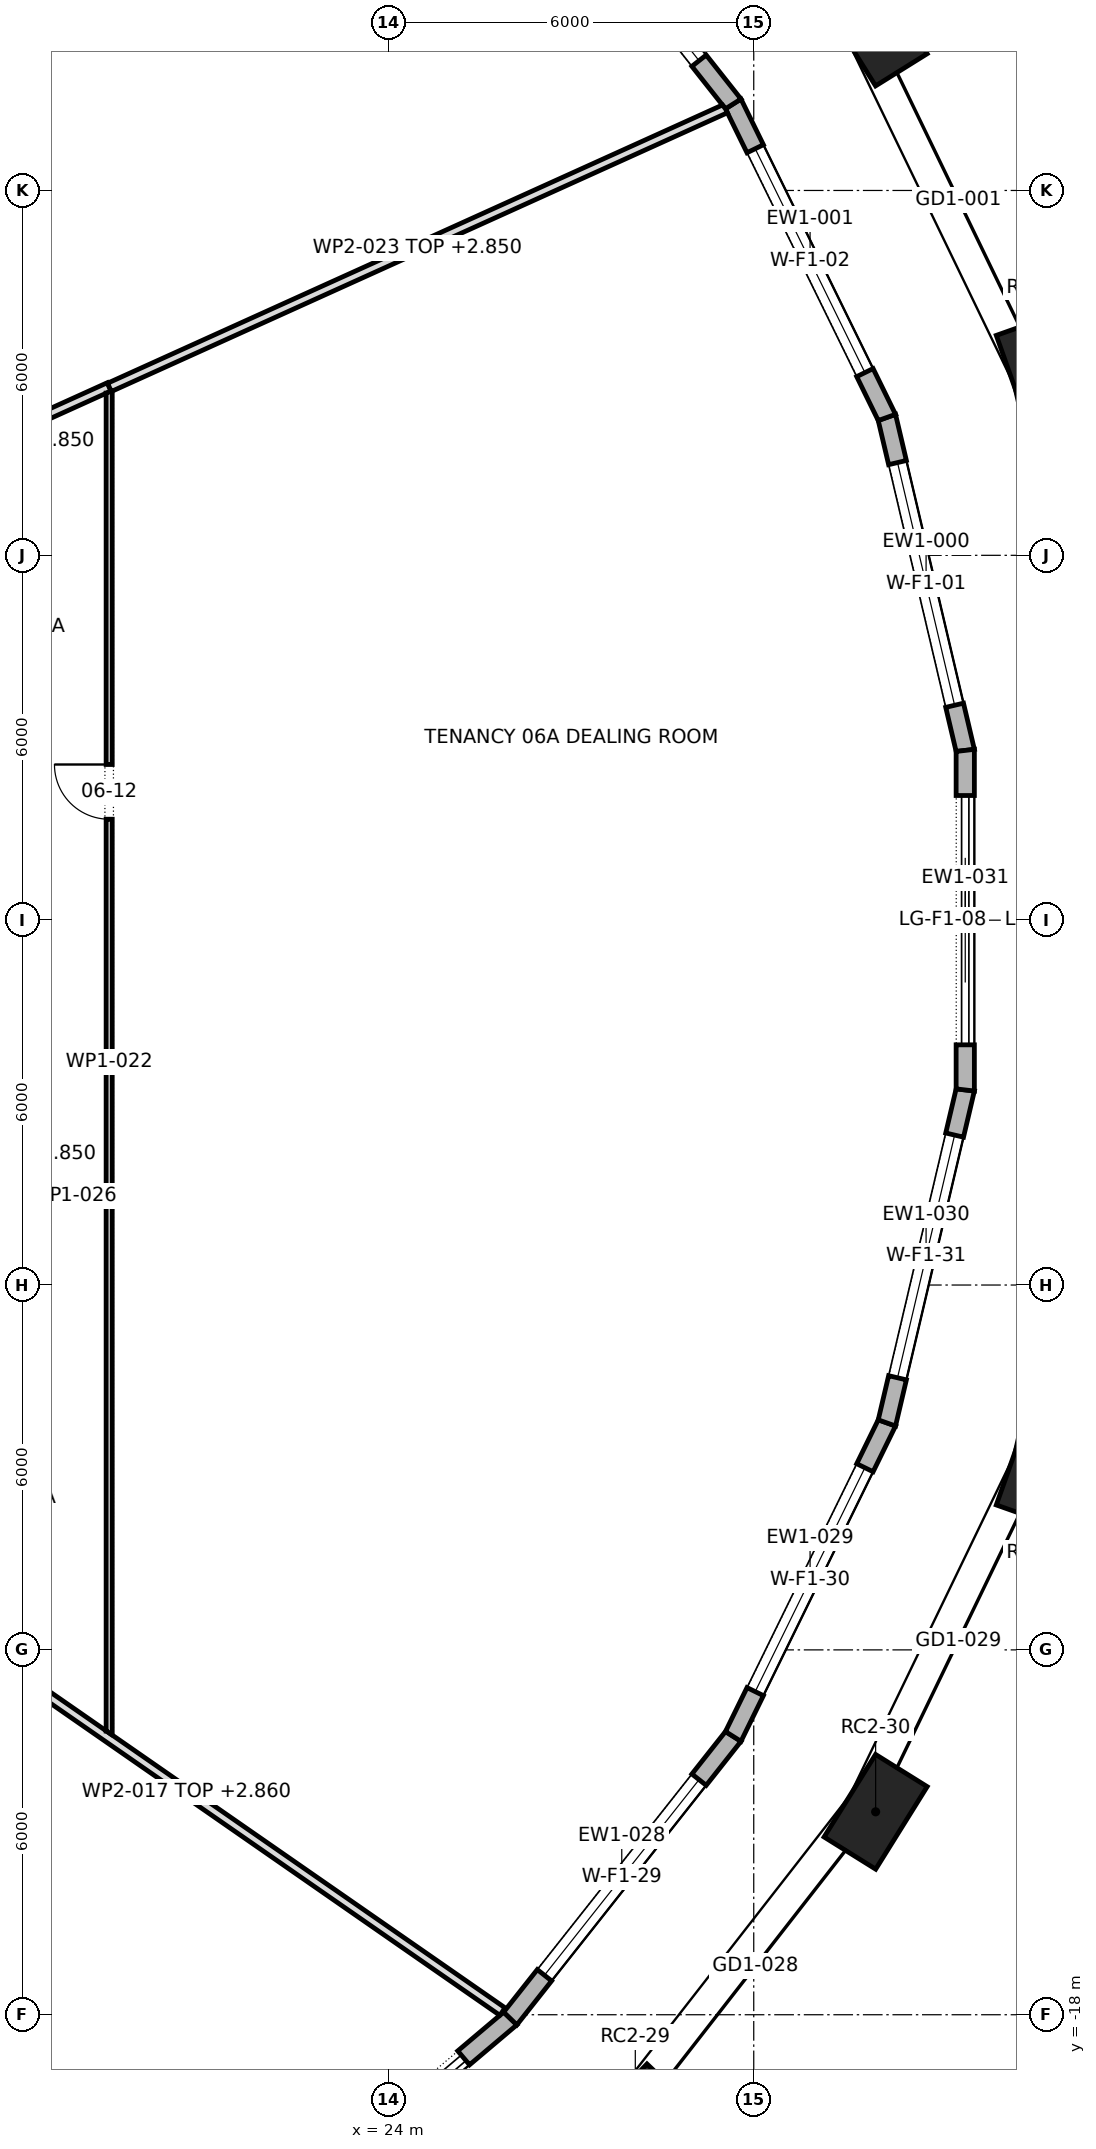
"""IFC4 building model, lengths in metres.
Left out: names, types, materials, properties, quantities, classifications, styles, units other than length and angle.
Written with IfcOpenShell. Run it as: python <this file> out.ifc"""

import sys

from ifc_helpers import new_model, si_unit, direction, frame, frame_2d, origin, origin_2d, place, context, subcontext, project, spatial, polyline, rectangle, outline, extrude, element, fill, save


model = new_model("IFC4")
c1 = context("Model", 3, precision=1e-05, world=origin(), true_north=direction((0.0, 1.0)))
c2 = subcontext(c1, "Body", "Model", "MODEL_VIEW")
j1 = project(units=[si_unit("LENGTHUNIT", "METRE"), si_unit("PLANEANGLEUNIT", "RADIAN")], contexts=[c1])
p1 = place(None, origin())
s1 = spatial("IfcSite", under=j1, at=p1, CompositionType="ELEMENT")
p2 = place(p1, origin())
s2 = spatial("IfcBuilding", under=s1, at=p2, CompositionType="ELEMENT")
p3 = place(p2, frame((0.0, 0.0, 86.5)))
s3 = spatial("IfcBuildingStorey", under=s2, at=p3, CompositionType="ELEMENT", Elevation=86.5)
for number, where, z_axis, x_axis in (
    (1, (34.727, 9.029, 0.0), (0.0, 0.0, 1.0), (-0.334, 0.943, 0.0)),
    (2, (32.004, 14.663, 0.0), (0.0, 0.0, 1.0), (-0.529, 0.849, 0.0)),
    (3, (28.052, -19.733, 0.0), (0.0, 0.0, 1.0), (0.692, 0.722, 0.0)),
    (4, (32.004, -14.663, 0.0), (0.0, 0.0, 1.0), (0.529, 0.849, 0.0)),
    (5, (34.727, -9.029, 0.0), (0.0, 0.0, 1.0), (0.334, 0.943, 0.0)),
):
    element("IfcColumn", number, at=place(p3, frame(where, z_axis=z_axis, x_axis=x_axis)), inside=s3, PredefinedType="COLUMN", context=c2, shape_type="SweptSolid", body=[
        extrude(rectangle(XDim=1.6, YDim=1.0, at=origin_2d()), origin(), (0.0, 0.0, 1.0), 4.2),
    ])
p4 = place(p3, frame((33.478, 2.792, 0.0), z_axis=(0.0, 0.0, 1.0), x_axis=(-0.229073200999, 0.973409198941, 0.0)))
e6 = element("IfcWall", 6, at=p4, inside=s3, PredefinedType="STANDARD", context=c2, shape_type="SweptSolid", body=[
    extrude(outline(polyline([(-0.017, -0.15), (5.642, -0.15), (5.608, 0.15), (0.017, 0.15), (-0.017, -0.15)])), origin(), (0.0, 0.0, 1.0), 3.9),
])
p5 = place(p4, frame((0.763, 0.0, 0.6)))
e7 = element("IfcOpeningElement", 7, at=p5, cuts=e6, PredefinedType="OPENING", context=c2, shape_type="SweptSolid", body=[
    extrude(rectangle(XDim=4.1, YDim=2.85, at=frame_2d((2.05, 1.425))), frame((0.0, 0.162, 0.0), z_axis=(0.0, -1.0, 0.0), x_axis=(1.0, 0.0, 0.0)), (0.0, 0.0, 1.0), 0.324),
])
p6 = place(p3, frame((32.19, 8.267, 0.0), z_axis=(0.0, 0.0, 1.0), x_axis=(-0.44010747541, 0.897945104162, 0.0)))
e8 = element("IfcWall", 8, at=p6, inside=s3, PredefinedType="STANDARD", context=c2, shape_type="SweptSolid", body=[
    extrude(outline(polyline([(-0.017, -0.15), (5.758, -0.15), (5.726, 0.15), (0.017, 0.15), (-0.017, -0.15)])), origin(), (0.0, 0.0, 1.0), 3.9),
])
p7 = place(p6, frame((0.821, 0.0, 0.6)))
e9 = element("IfcOpeningElement", 9, at=p7, cuts=e8, PredefinedType="OPENING", context=c2, shape_type="SweptSolid", body=[
    extrude(rectangle(XDim=4.1, YDim=2.85, at=frame_2d((2.05, 1.425))), frame((0.0, 0.162, 0.0), z_axis=(0.0, -1.0, 0.0), x_axis=(1.0, 0.0, 0.0)), (0.0, 0.0, 1.0), 0.324),
])
p8 = place(p3, frame((29.663, 13.423, 0.0), z_axis=(0.0, 0.0, 1.0), x_axis=(-0.620142219764, 0.784489405452, 0.0)))
e10 = element("IfcWall", 10, at=p8, inside=s3, PredefinedType="STANDARD", context=c2, shape_type="SweptSolid", body=[
    extrude(outline(polyline([(-0.016, -0.15), (5.927, -0.15), (5.897, 0.15), (0.016, 0.15), (-0.016, -0.15)])), origin(), (0.0, 0.0, 1.0), 3.9),
])
p9 = place(p8, frame((0.906, 0.0, 0.6)))
e11 = element("IfcOpeningElement", 11, at=p9, cuts=e10, PredefinedType="OPENING", context=c2, shape_type="SweptSolid", body=[
    extrude(rectangle(XDim=4.1, YDim=2.85, at=frame_2d((2.05, 1.425))), frame((0.0, 0.162, 0.0), z_axis=(0.0, -1.0, 0.0), x_axis=(1.0, 0.0, 0.0)), (0.0, 0.0, 1.0), 0.324),
])
p10 = place(p3, frame((21.332, -22.004, 0.0), z_axis=(0.0, 0.0, 1.0), x_axis=(0.763753100684, 0.645508482667, 0.0)))
e12 = element("IfcWall", 12, at=p10, inside=s3, PredefinedType="STANDARD", context=c2, shape_type="SweptSolid", body=[
    extrude(outline(polyline([(-0.014, -0.15), (6.123, -0.15), (6.092, 0.15), (0.014, 0.15), (-0.014, -0.15)])), origin(), (0.0, 0.0, 1.0), 3.9),
])
p11 = place(p10, frame((1.004, 0.0, 0.0)))
e13 = element("IfcOpeningElement", 13, at=p11, cuts=e12, PredefinedType="OPENING", context=c2, shape_type="SweptSolid", body=[
    extrude(rectangle(XDim=4.1, YDim=3.45, at=frame_2d((2.05, 1.725))), frame((0.0, 0.162, 0.0), z_axis=(0.0, -1.0, 0.0), x_axis=(1.0, 0.0, 0.0)), (0.0, 0.0, 1.0), 0.324),
])
p12 = place(p3, frame((25.996, -18.062, 0.0), z_axis=(0.0, 0.0, 1.0), x_axis=(0.620142219764, 0.784489405452, 0.0)))
e14 = element("IfcWall", 14, at=p12, inside=s3, PredefinedType="STANDARD", context=c2, shape_type="SweptSolid", body=[
    extrude(outline(polyline([(-0.015, -0.15), (5.928, -0.15), (5.896, 0.15), (0.015, 0.15), (-0.015, -0.15)])), origin(), (0.0, 0.0, 1.0), 3.9),
])
p13 = place(p12, frame((0.906, 0.0, 0.6)))
e15 = element("IfcOpeningElement", 15, at=p13, cuts=e14, PredefinedType="OPENING", context=c2, shape_type="SweptSolid", body=[
    extrude(rectangle(XDim=4.1, YDim=2.85, at=frame_2d((2.05, 1.425))), frame((0.0, 0.162, 0.0), z_axis=(0.0, -1.0, 0.0), x_axis=(1.0, 0.0, 0.0)), (0.0, 0.0, 1.0), 0.324),
])
p14 = place(p3, frame((29.663, -13.423, 0.0), z_axis=(0.0, 0.0, 1.0), x_axis=(0.44010747541, 0.897945104162, 0.0)))
e16 = element("IfcWall", 16, at=p14, inside=s3, PredefinedType="STANDARD", context=c2, shape_type="SweptSolid", body=[
    extrude(outline(polyline([(-0.016, -0.15), (5.759, -0.15), (5.725, 0.15), (0.016, 0.15), (-0.016, -0.15)])), origin(), (0.0, 0.0, 1.0), 3.9),
])
p15 = place(p14, frame((0.821, 0.0, 0.6)))
e17 = element("IfcOpeningElement", 17, at=p15, cuts=e16, PredefinedType="OPENING", context=c2, shape_type="SweptSolid", body=[
    extrude(rectangle(XDim=4.1, YDim=2.85, at=frame_2d((2.05, 1.425))), frame((0.0, 0.162, 0.0), z_axis=(0.0, -1.0, 0.0), x_axis=(1.0, 0.0, 0.0)), (0.0, 0.0, 1.0), 0.324),
])
p16 = place(p3, frame((32.19, -8.267, 0.0), z_axis=(0.0, 0.0, 1.0), x_axis=(0.229073200999, 0.973409198941, 0.0)))
e18 = element("IfcWall", 18, at=p16, inside=s3, PredefinedType="STANDARD", context=c2, shape_type="SweptSolid", body=[
    extrude(outline(polyline([(-0.017, -0.15), (5.643, -0.15), (5.608, 0.15), (0.017, 0.15), (-0.017, -0.15)])), origin(), (0.0, 0.0, 1.0), 3.9),
])
p17 = place(p16, frame((0.763, 0.0, 0.6)))
e19 = element("IfcOpeningElement", 19, at=p17, cuts=e18, PredefinedType="OPENING", context=c2, shape_type="SweptSolid", body=[
    extrude(rectangle(XDim=4.1, YDim=2.85, at=frame_2d((2.05, 1.425))), frame((0.0, 0.162, 0.0), z_axis=(0.0, -1.0, 0.0), x_axis=(1.0, 0.0, 0.0)), (0.0, 0.0, 1.0), 0.324),
])
p18 = place(p3, frame((33.478, -2.792, 0.0), z_axis=(0.0, 0.0, 1.0), x_axis=(0.0, 1.0, 0.0)))
e20 = element("IfcWall", 20, at=p18, inside=s3, PredefinedType="STANDARD", context=c2, shape_type="SweptSolid", body=[
    extrude(outline(polyline([(-0.017, -0.15), (5.601, -0.15), (5.566, 0.15), (0.017, 0.15), (-0.017, -0.15)])), origin(), (0.0, 0.0, 1.0), 3.9),
])
p19 = place(p18, frame((0.742, 0.0, 0.0)))
e21 = element("IfcOpeningElement", 21, at=p19, cuts=e20, PredefinedType="OPENING", context=c2, shape_type="SweptSolid", body=[
    extrude(rectangle(XDim=4.1, YDim=3.45, at=frame_2d((2.05, 1.725))), frame((0.0, 0.162, 0.0), z_axis=(0.0, -1.0, 0.0), x_axis=(1.0, 0.0, 0.0)), (0.0, 0.0, 1.0), 0.324),
])
p20 = place(p3, frame((15.418, -10.692, 0.0), z_axis=(0.0, 0.0, 1.0), x_axis=(0.821423906774, -0.57031812647, 0.0)))
e22 = element("IfcWall", 22, at=p20, inside=s3, PredefinedType="PARTITIONING", context=c2, shape_type="SweptSolid", body=[
    extrude(outline(polyline([(0.122, -0.075), (1.922, -0.075), (3.722, -0.075), (5.522, -0.075), (7.322, -0.075), (9.122, -0.075), (10.922, -0.075), (12.722, -0.075), (12.722, -0.074), (12.722, 0.075), (10.727, 0.075), (8.732, 0.075), (6.737, 0.075), (4.741, 0.075), (4.737, 0.072), (4.735, 0.075), (3.157, 0.075), (1.578, 0.075), (0.0, 0.075), (0.0, 0.074), (0.028, 0.034), (0.04, 0.043), (0.122, -0.075)])), origin(), (0.0, 0.0, 1.0), 2.86),
])
p21 = place(p3, frame((15.444, 6.98, 0.0), z_axis=(0.0, 0.0, 1.0), x_axis=(0.911064178848, 0.412264553436, 0.0)))
e23 = element("IfcWall", 23, at=p21, inside=s3, PredefinedType="PARTITIONING", context=c2, shape_type="SweptSolid", body=[
    extrude(outline(polyline([(0.0, -0.075), (1.418, -0.075), (2.835, -0.075), (4.253, -0.075), (4.254, -0.073), (4.259, -0.075), (4.342, -0.075), (4.342, 0.075), (2.917, 0.075), (1.493, 0.075), (0.068, 0.075), (0.0, -0.075)])), origin(), (0.0, 0.0, 1.0), 2.85),
])
p22 = place(p3, frame((19.4, -13.4, 0.0), z_axis=(0.0, 0.0, 1.0), x_axis=(0.0, 1.0, 0.0)))
e24 = element("IfcWall", 24, at=p22, inside=s3, PredefinedType="PARTITIONING", context=c2, shape_type="SweptSolid", body=[
    extrude(outline(polyline([(22.1, -0.05), (22.1, -0.049), (22.094, -0.036), (22.1, -0.033), (22.1, -0.027), (22.065, 0.05), (20.186, 0.05), (18.307, 0.05), (16.427, 0.05), (14.548, 0.05), (12.669, 0.05), (10.79, 0.05), (8.91, 0.05), (8.91, 0.05), (8.81, 0.05), (8.81, 0.05), (7.062, 0.05), (5.314, 0.05), (3.566, 0.05), (1.817, 0.05), (0.069, 0.05), (0.0, -0.05), (0.0, -0.05), (1.842, -0.05), (3.683, -0.05), (5.525, -0.05), (7.367, -0.05), (9.208, -0.05), (11.05, -0.05), (12.892, -0.05), (14.734, -0.05), (16.575, -0.05), (18.417, -0.05), (20.259, -0.05), (22.1, -0.05)])), origin(), (0.0, 0.0, 1.0), 3.9),
])
p23 = place(p22, frame((15.061, 0.0, 0.0)))
e25 = element("IfcOpeningElement", 25, at=p23, cuts=e24, PredefinedType="OPENING", context=c2, shape_type="SweptSolid", body=[
    extrude(rectangle(XDim=0.9, YDim=2.1, at=frame_2d((0.45, 1.05))), frame((0.0, 0.062, 0.0), z_axis=(0.0, -1.0, 0.0), x_axis=(1.0, 0.0, 0.0)), (0.0, 0.0, 1.0), 0.124),
])
p24 = place(p3, frame((19.404, 8.762, 0.0), z_axis=(0.0, 0.0, 1.0), x_axis=(0.911089862884, 0.41220778953, 0.0)))
e26 = element("IfcWall", 26, at=p24, inside=s3, PredefinedType="PARTITIONING", context=c2, shape_type="SweptSolid", body=[
    extrude(outline(polyline([(11.121, -0.075), (11.121, -0.067), (11.119, -0.002), (11.099, 0.075), (9.25, 0.075), (7.4, 0.075), (5.55, 0.075), (3.7, 0.075), (1.85, 0.075), (0.0, 0.075), (0.0, -0.068), (0.015, -0.075), (1.866, -0.075), (3.717, -0.075), (5.568, -0.075), (7.419, -0.075), (9.27, -0.075), (11.121, -0.075)])), origin(), (0.0, 0.0, 1.0), 2.85),
])
p25 = place(p3, frame((18.269, -4.54, 0.0), z_axis=(0.0, 0.0, 1.0), x_axis=(1.0, 0.0, 0.0)))
e27 = element("IfcWall", 27, at=p25, inside=s3, PredefinedType="PARTITIONING", context=c2, shape_type="SweptSolid", body=[
    extrude(outline(polyline([(0.0, -0.05), (1.081, -0.05), (1.081, 0.05), (0.0, 0.05), (0.0, -0.05)])), origin(), (0.0, 0.0, 1.0), 3.9),
])
p26 = place(p5, origin())
e28 = element("IfcWindow", 28, at=p26, inside=s3, PartitioningType="TRIPLE_PANEL_VERTICAL", PredefinedType="WINDOW", context=c2, shape_type="SweptSolid", body=[
    extrude(rectangle(XDim=4.1, YDim=2.85, at=frame_2d((2.05, 1.425))), frame((0.0, 0.03, 0.0), z_axis=(0.0, -1.0, 0.0), x_axis=(1.0, 0.0, 0.0)), (0.0, 0.0, 1.0), 0.06),
])
fill(e7, e28)
p27 = place(p7, origin())
e29 = element("IfcWindow", 29, at=p27, inside=s3, PartitioningType="TRIPLE_PANEL_VERTICAL", PredefinedType="WINDOW", context=c2, shape_type="SweptSolid", body=[
    extrude(rectangle(XDim=4.1, YDim=2.85, at=frame_2d((2.05, 1.425))), frame((0.0, 0.03, 0.0), z_axis=(0.0, -1.0, 0.0), x_axis=(1.0, 0.0, 0.0)), (0.0, 0.0, 1.0), 0.06),
])
fill(e9, e29)
p28 = place(p9, origin())
e30 = element("IfcWindow", 30, at=p28, inside=s3, PartitioningType="TRIPLE_PANEL_VERTICAL", PredefinedType="WINDOW", context=c2, shape_type="SweptSolid", body=[
    extrude(rectangle(XDim=4.1, YDim=2.85, at=frame_2d((2.05, 1.425))), frame((0.0, 0.03, 0.0), z_axis=(0.0, -1.0, 0.0), x_axis=(1.0, 0.0, 0.0)), (0.0, 0.0, 1.0), 0.06),
])
fill(e11, e30)
p29 = place(p11, origin())
e31 = element("IfcDoor", 31, at=p29, inside=s3, OperationType="DOUBLE_DOOR_SLIDING", PredefinedType="DOOR", context=c2, shape_type="SweptSolid", body=[
    extrude(rectangle(XDim=4.1, YDim=3.45, at=frame_2d((2.05, 1.725))), frame((0.0, 0.025, 0.0), z_axis=(0.0, -1.0, 0.0), x_axis=(1.0, 0.0, 0.0)), (0.0, 0.0, 1.0), 0.05),
])
fill(e13, e31)
p30 = place(p13, origin())
e32 = element("IfcWindow", 32, at=p30, inside=s3, PartitioningType="TRIPLE_PANEL_VERTICAL", PredefinedType="WINDOW", context=c2, shape_type="SweptSolid", body=[
    extrude(rectangle(XDim=4.1, YDim=2.85, at=frame_2d((2.05, 1.425))), frame((0.0, 0.03, 0.0), z_axis=(0.0, -1.0, 0.0), x_axis=(1.0, 0.0, 0.0)), (0.0, 0.0, 1.0), 0.06),
])
fill(e15, e32)
p31 = place(p15, origin())
e33 = element("IfcWindow", 33, at=p31, inside=s3, PartitioningType="TRIPLE_PANEL_VERTICAL", PredefinedType="WINDOW", context=c2, shape_type="SweptSolid", body=[
    extrude(rectangle(XDim=4.1, YDim=2.85, at=frame_2d((2.05, 1.425))), frame((0.0, 0.03, 0.0), z_axis=(0.0, -1.0, 0.0), x_axis=(1.0, 0.0, 0.0)), (0.0, 0.0, 1.0), 0.06),
])
fill(e17, e33)
p32 = place(p17, origin())
e34 = element("IfcWindow", 34, at=p32, inside=s3, PartitioningType="TRIPLE_PANEL_VERTICAL", PredefinedType="WINDOW", context=c2, shape_type="SweptSolid", body=[
    extrude(rectangle(XDim=4.1, YDim=2.85, at=frame_2d((2.05, 1.425))), frame((0.0, 0.03, 0.0), z_axis=(0.0, -1.0, 0.0), x_axis=(1.0, 0.0, 0.0)), (0.0, 0.0, 1.0), 0.06),
])
fill(e19, e34)
p33 = place(p19, origin())
e35 = element("IfcDoor", 35, at=p33, inside=s3, OperationType="DOUBLE_DOOR_SLIDING", PredefinedType="DOOR", context=c2, shape_type="SweptSolid", body=[
    extrude(rectangle(XDim=4.1, YDim=3.45, at=frame_2d((2.05, 1.725))), frame((0.0, 0.025, 0.0), z_axis=(0.0, -1.0, 0.0), x_axis=(1.0, 0.0, 0.0)), (0.0, 0.0, 1.0), 0.05),
])
fill(e21, e35)
p34 = place(p23, origin())
e36 = element("IfcDoor", 36, at=p34, inside=s3, OperationType="SINGLE_SWING_LEFT", PredefinedType="DOOR", context=c2, shape_type="SweptSolid", body=[
    extrude(rectangle(XDim=0.9, YDim=2.1, at=frame_2d((0.45, 1.05))), frame((0.0, 0.025, 0.0), z_axis=(0.0, -1.0, 0.0), x_axis=(1.0, 0.0, 0.0)), (0.0, 0.0, 1.0), 0.05),
])
fill(e25, e36)
save(model, sys.argv[1])
